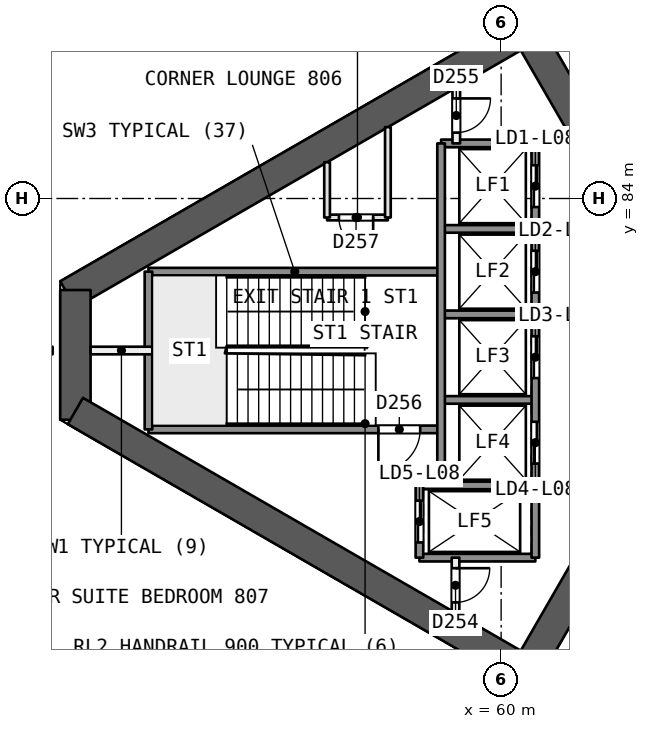
"""IFC4 building model, lengths in metres.
Left out: names, types, materials, properties, quantities, classifications, styles, units other than length and angle.
Written with IfcOpenShell. Run it as: python <this file> out.ifc"""

import sys

from ifc_helpers import new_model, si_unit, direction, frame, frame_2d, origin, place, context, subcontext, project, spatial, rectangle, extrude, element, fill, save


model = new_model("IFC4")
c1 = context("Model", 3, precision=1e-05, world=origin(), true_north=direction((0.0, 1.0)))
c2 = subcontext(c1, "Body", "Model", "MODEL_VIEW")
j1 = project(units=[si_unit("LENGTHUNIT", "METRE"), si_unit("PLANEANGLEUNIT", "RADIAN")], contexts=[c1])
p1 = place(None, origin())
s1 = spatial("IfcSite", under=j1, at=p1, CompositionType="ELEMENT")
p2 = place(p1, origin())
s2 = spatial("IfcBuilding", under=s1, at=p2, CompositionType="ELEMENT")
p3 = place(p2, frame((0.0, 0.0, 41.1)))
s3 = spatial("IfcBuildingStorey", under=s2, at=p3, CompositionType="ELEMENT", Elevation=41.1)
p4 = place(p3, frame((65.538, 80.0, 0.0), z_axis=(0.0, 0.0, 1.0), x_axis=(-0.49999662545, 0.866027352073, 0.0)))
e1 = element("IfcWall", 1, at=p4, inside=s3, PredefinedType="SHEAR", context=c2, shape_type="SweptSolid", body=[
    extrude(rectangle(XDim=10.149, YDim=0.8, at=frame_2d((5.074, 0.0))), origin(), (0.0, 0.0, 1.0), 3.7),
])
p5 = place(p4, frame((0.719, 0.0, 0.0)))
e2 = element("IfcOpeningElement", 2, at=p5, cuts=e1, PredefinedType="OPENING", context=c2, shape_type="SweptSolid", body=[
    extrude(rectangle(XDim=1.2, YDim=2.1, at=frame_2d((0.6, 1.05))), frame((0.0, 0.411, 0.0), z_axis=(0.0, -1.0, 0.0), x_axis=(1.0, 0.0, 0.0)), (0.0, 0.0, 1.0), 0.821),
])
p6 = place(p3, frame((60.664, 88.443, 0.0), z_axis=(0.0, 0.0, 1.0), x_axis=(-0.866029478545, -0.499992942241, 0.0)))
e3 = element("IfcWall", 3, at=p6, inside=s3, PredefinedType="SHEAR", context=c2, shape_type="SweptSolid", body=[
    extrude(rectangle(XDim=13.933, YDim=0.8, at=frame_2d((6.967, 0.0))), origin(), (0.0, 0.0, 1.0), 3.7),
])
p7 = place(p3, frame((48.797, 81.592, 0.0), z_axis=(0.0, 0.0, 1.0), x_axis=(0.0, -1.0, 0.0)))
e4 = element("IfcWall", 4, at=p7, inside=s3, PredefinedType="SHEAR", context=c2, shape_type="SweptSolid", body=[
    extrude(rectangle(XDim=3.415, YDim=0.8, at=frame_2d((1.707, 0.0))), origin(), (0.0, 0.0, 1.0), 3.7),
])
p8 = place(p3, frame((48.797, 78.408, 0.0), z_axis=(0.0, 0.0, 1.0), x_axis=(0.866032504327, -0.499987701298, 0.0)))
e5 = element("IfcWall", 5, at=p8, inside=s3, PredefinedType="SHEAR", context=c2, shape_type="SweptSolid", body=[
    extrude(rectangle(XDim=14.102, YDim=0.8, at=frame_2d((7.051, 0.0))), origin(), (0.0, 0.0, 1.0), 3.7),
])
p9 = place(p3, frame((60.664, 71.557, 0.0), z_axis=(0.0, 0.0, 1.0), x_axis=(0.50000409368, 0.866023040284, 0.0)))
e6 = element("IfcWall", 6, at=p9, inside=s3, PredefinedType="SHEAR", context=c2, shape_type="SweptSolid", body=[
    extrude(rectangle(XDim=9.98, YDim=0.8, at=frame_2d((4.99, 0.0))), origin(), (0.0, 0.0, 1.0), 3.7),
])
p10 = place(p9, frame((7.83, 0.0, 0.0)))
e7 = element("IfcOpeningElement", 7, at=p10, cuts=e6, PredefinedType="OPENING", context=c2, shape_type="SweptSolid", body=[
    extrude(rectangle(XDim=1.2, YDim=2.1, at=frame_2d((0.6, 1.05))), frame((0.0, 0.411, 0.0), z_axis=(0.0, -1.0, 0.0), x_axis=(1.0, 0.0, 0.0)), (0.0, 0.0, 1.0), 0.821),
])
p11 = place(p3, frame((61.197, 96.426, 0.0), z_axis=(0.0, 0.0, 1.0), x_axis=(0.499997162821, -0.866027041824, 0.0)))
e8 = element("IfcWall", 8, at=p11, inside=s3, PredefinedType="PARTITIONING", context=c2, shape_type="SweptSolid", body=[
    extrude(rectangle(XDim=14.027, YDim=0.2, at=frame_2d((7.013, 0.0))), origin(), (0.0, 0.0, 1.0), 3.2),
])
p12 = place(p3, frame((38.019, 80.0, 0.0), z_axis=(0.0, 0.0, 1.0), x_axis=(1.0, 0.0, 0.0)))
e9 = element("IfcWall", 9, at=p12, inside=s3, PredefinedType="PARTITIONING", context=c2, shape_type="SweptSolid", body=[
    extrude(rectangle(XDim=10.179, YDim=0.2, at=frame_2d((5.089, 0.0))), origin(), (0.0, 0.0, 1.0), 3.2),
])
p13 = place(p3, frame((37.87, 83.13, 0.0), z_axis=(0.0, 0.0, 1.0), x_axis=(0.866026630825, 0.499997874697, 0.0)))
e10 = element("IfcWall", 10, at=p13, inside=s3, PredefinedType="SOLIDWALL", context=c2, shape_type="SweptSolid", body=[
    extrude(rectangle(XDim=61.18, YDim=0.3, at=frame_2d((30.59, 0.0))), origin(), (0.0, 0.0, 1.0), 3.2),
])
p14 = place(p13, frame((12.181, 0.0, 0.0)))
e11 = element("IfcOpeningElement", 11, at=p14, cuts=e10, PredefinedType="OPENING", context=c2, shape_type="SweptSolid", body=[
    extrude(rectangle(XDim=2.4, YDim=2.4, at=frame_2d((1.2, 1.2))), frame((0.0, 0.161, 0.0), z_axis=(0.0, -1.0, 0.0), x_axis=(1.0, 0.0, 0.0)), (0.0, 0.0, 1.0), 0.321),
])
p15 = place(p13, frame((34.846, 0.0, 0.0)))
e12 = element("IfcOpeningElement", 12, at=p15, cuts=e10, PredefinedType="OPENING", context=c2, shape_type="SweptSolid", body=[
    extrude(rectangle(XDim=2.4, YDim=2.4, at=frame_2d((1.2, 1.2))), frame((0.0, 0.161, 0.0), z_axis=(0.0, -1.0, 0.0), x_axis=(1.0, 0.0, 0.0)), (0.0, 0.0, 1.0), 0.321),
])
p16 = place(p13, frame((47.439, 0.0, 0.0)))
e13 = element("IfcOpeningElement", 13, at=p16, cuts=e10, PredefinedType="OPENING", context=c2, shape_type="SweptSolid", body=[
    extrude(rectangle(XDim=2.4, YDim=2.4, at=frame_2d((1.2, 1.2))), frame((0.0, 0.161, 0.0), z_axis=(0.0, -1.0, 0.0), x_axis=(1.0, 0.0, 0.0)), (0.0, 0.0, 1.0), 0.321),
])
p17 = place(p13, frame((29.078, 0.0, 0.0)))
e14 = element("IfcOpeningElement", 14, at=p17, cuts=e10, PredefinedType="OPENING", context=c2, shape_type="SweptSolid", body=[
    extrude(rectangle(XDim=2.4, YDim=2.4, at=frame_2d((1.2, 1.2))), frame((0.0, 0.161, 0.0), z_axis=(0.0, -1.0, 0.0), x_axis=(1.0, 0.0, 0.0)), (0.0, 0.0, 1.0), 0.321),
])
p18 = place(p3, frame((90.854, 46.28, 0.0), z_axis=(0.0, 0.0, 1.0), x_axis=(-0.866026630825, 0.499997874697, 0.0)))
e15 = element("IfcWall", 15, at=p18, inside=s3, PredefinedType="SOLIDWALL", context=c2, shape_type="SweptSolid", body=[
    extrude(rectangle(XDim=61.18, YDim=0.3, at=frame_2d((30.59, 0.0))), origin(), (0.0, 0.0, 1.0), 3.2),
])
p19 = place(p18, frame((29.39, 0.0, 0.0)))
e16 = element("IfcOpeningElement", 16, at=p19, cuts=e15, PredefinedType="OPENING", context=c2, shape_type="SweptSolid", body=[
    extrude(rectangle(XDim=2.4, YDim=2.4, at=frame_2d((1.2, 1.2))), frame((0.0, 0.161, 0.0), z_axis=(0.0, -1.0, 0.0), x_axis=(1.0, 0.0, 0.0)), (0.0, 0.0, 1.0), 0.321),
])
p20 = place(p18, frame((34.223, 0.0, 0.0)))
e17 = element("IfcOpeningElement", 17, at=p20, cuts=e15, PredefinedType="OPENING", context=c2, shape_type="SweptSolid", body=[
    extrude(rectangle(XDim=2.4, YDim=2.4, at=frame_2d((1.2, 1.2))), frame((0.0, 0.161, 0.0), z_axis=(0.0, -1.0, 0.0), x_axis=(1.0, 0.0, 0.0)), (0.0, 0.0, 1.0), 0.321),
])
p21 = place(p18, frame((47.439, 0.0, 0.0)))
e18 = element("IfcOpeningElement", 18, at=p21, cuts=e15, PredefinedType="OPENING", context=c2, shape_type="SweptSolid", body=[
    extrude(rectangle(XDim=2.4, YDim=2.4, at=frame_2d((1.2, 1.2))), frame((0.0, 0.161, 0.0), z_axis=(0.0, -1.0, 0.0), x_axis=(1.0, 0.0, 0.0)), (0.0, 0.0, 1.0), 0.321),
])
p22 = place(p18, frame((13.116, 0.0, 0.0)))
e19 = element("IfcOpeningElement", 19, at=p22, cuts=e15, PredefinedType="OPENING", context=c2, shape_type="SweptSolid", body=[
    extrude(rectangle(XDim=2.4, YDim=2.4, at=frame_2d((1.2, 1.2))), frame((0.0, 0.161, 0.0), z_axis=(0.0, -1.0, 0.0), x_axis=(1.0, 0.0, 0.0)), (0.0, 0.0, 1.0), 0.321),
])
p23 = place(p3, frame((60.9, 85.45, 0.0), z_axis=(0.0, 0.0, 1.0), x_axis=(-1.0, 0.0, 0.0)))
e20 = element("IfcWall", 20, at=p23, inside=s3, PredefinedType="SOLIDWALL", context=c2, shape_type="SweptSolid", body=[
    extrude(rectangle(XDim=2.48, YDim=0.2, at=frame_2d((1.24, 0.0))), origin(), (0.0, 0.0, 1.0), 3.2),
])
p24 = place(p3, frame((57.02, 83.5, 0.0), z_axis=(0.0, 0.0, 1.0), x_axis=(-1.0, 0.0, 0.0)))
e21 = element("IfcWall", 21, at=p24, inside=s3, PredefinedType="PARTITIONING", context=c2, shape_type="SweptSolid", body=[
    extrude(rectangle(XDim=1.6, YDim=0.15, at=frame_2d((0.8, 0.0))), origin(), (0.0, 0.0, 1.0), 3.2),
])
p25 = place(p24, frame((0.387, 0.0, 0.0)))
e22 = element("IfcOpeningElement", 22, at=p25, cuts=e21, PredefinedType="OPENING", context=c2, shape_type="SweptSolid", body=[
    extrude(rectangle(XDim=0.9, YDim=2.1, at=frame_2d((0.45, 1.05))), frame((0.0, 0.085, 0.0), z_axis=(0.0, -1.0, 0.0), x_axis=(1.0, 0.0, 0.0)), (0.0, 0.0, 1.0), 0.171),
])
p26 = place(p3, frame((60.9, 83.2, 0.0), z_axis=(0.0, 0.0, 1.0), x_axis=(-1.0, 0.0, 0.0)))
e23 = element("IfcWall", 23, at=p26, inside=s3, PredefinedType="SOLIDWALL", context=c2, shape_type="SweptSolid", body=[
    extrude(rectangle(XDim=2.48, YDim=0.2, at=frame_2d((1.24, 0.0))), origin(), (0.0, 0.0, 1.0), 3.2),
])
p27 = place(p3, frame((58.42, 82.075, 0.0), z_axis=(0.0, 0.0, 1.0), x_axis=(-1.0, 0.0, 0.0)))
e24 = element("IfcWall", 24, at=p27, inside=s3, PredefinedType="SOLIDWALL", context=c2, shape_type="SweptSolid", body=[
    extrude(rectangle(XDim=7.7, YDim=0.2, at=frame_2d((3.85, 0.0))), origin(), (0.0, 0.0, 1.0), 3.2),
])
p28 = place(p3, frame((60.9, 80.95, 0.0), z_axis=(0.0, 0.0, 1.0), x_axis=(-1.0, 0.0, 0.0)))
e25 = element("IfcWall", 25, at=p28, inside=s3, PredefinedType="SOLIDWALL", context=c2, shape_type="SweptSolid", body=[
    extrude(rectangle(XDim=2.48, YDim=0.2, at=frame_2d((1.24, 0.0))), origin(), (0.0, 0.0, 1.0), 3.2),
])
p29 = place(p3, frame((50.82, 80.0, 0.0), z_axis=(0.0, 0.0, 1.0), x_axis=(-1.0, 0.0, 0.0)))
e26 = element("IfcWall", 26, at=p29, inside=s3, PredefinedType="PARTITIONING", context=c2, shape_type="SweptSolid", body=[
    extrude(rectangle(XDim=1.623, YDim=0.2, at=frame_2d((0.812, 0.0))), origin(), (0.0, 0.0, 1.0), 3.2),
])
p30 = place(p3, frame((60.9, 78.7, 0.0), z_axis=(0.0, 0.0, 1.0), x_axis=(-1.0, 0.0, 0.0)))
e27 = element("IfcWall", 27, at=p30, inside=s3, PredefinedType="SOLIDWALL", context=c2, shape_type="SweptSolid", body=[
    extrude(rectangle(XDim=2.48, YDim=0.2, at=frame_2d((1.24, 0.0))), origin(), (0.0, 0.0, 1.0), 3.2),
])
p31 = place(p3, frame((58.42, 77.925, 0.0), z_axis=(0.0, 0.0, 1.0), x_axis=(-1.0, 0.0, 0.0)))
e28 = element("IfcWall", 28, at=p31, inside=s3, PredefinedType="SOLIDWALL", context=c2, shape_type="SweptSolid", body=[
    extrude(rectangle(XDim=7.7, YDim=0.2, at=frame_2d((3.85, 0.0))), origin(), (0.0, 0.0, 1.0), 3.2),
])
p32 = place(p31, frame((0.55, 0.0, 0.0)))
e29 = element("IfcOpeningElement", 29, at=p32, cuts=e28, PredefinedType="OPENING", context=c2, shape_type="SweptSolid", body=[
    extrude(rectangle(XDim=1.1, YDim=2.1, at=frame_2d((0.55, 1.05))), frame((0.0, 0.11, 0.0), z_axis=(0.0, -1.0, 0.0), x_axis=(1.0, 0.0, 0.0)), (0.0, 0.0, 1.0), 0.221),
])
for number, where, z_axis, x_axis in (
    (30, (60.9, 76.45, 0.0), (0.0, 0.0, 1.0), (-1.0, 0.0, 0.0)),
    (31, (60.9, 74.55, 0.0), (0.0, 0.0, 1.0), (-1.0, 0.0, 0.0)),
):
    element("IfcWall", number, at=place(p3, frame(where, z_axis=z_axis, x_axis=x_axis)), inside=s3, PredefinedType="SOLIDWALL", context=c2, shape_type="SweptSolid", body=[
        extrude(rectangle(XDim=3.05, YDim=0.2, at=frame_2d((1.525, 0.0))), origin(), (0.0, 0.0, 1.0), 3.2),
    ])
p33 = place(p3, frame((60.9, 85.45, 0.0), z_axis=(0.0, 0.0, 1.0), x_axis=(0.0, -1.0, 0.0)))
e32 = element("IfcWall", 32, at=p33, inside=s3, PredefinedType="SOLIDWALL", context=c2, shape_type="SweptSolid", body=[
    extrude(rectangle(XDim=10.9, YDim=0.2, at=frame_2d((5.45, 0.0))), origin(), (0.0, 0.0, 1.0), 3.2),
])
p34 = place(p33, frame((0.575, 0.0, 0.0)))
e33 = element("IfcOpeningElement", 33, at=p34, cuts=e32, PredefinedType="OPENING", context=c2, shape_type="SweptSolid", body=[
    extrude(rectangle(XDim=1.1, YDim=2.1, at=frame_2d((0.55, 1.05))), frame((0.0, 0.11, 0.0), z_axis=(0.0, -1.0, 0.0), x_axis=(1.0, 0.0, 0.0)), (0.0, 0.0, 1.0), 0.221),
])
p35 = place(p33, frame((2.825, 0.0, 0.0)))
e34 = element("IfcOpeningElement", 34, at=p35, cuts=e32, PredefinedType="OPENING", context=c2, shape_type="SweptSolid", body=[
    extrude(rectangle(XDim=1.1, YDim=2.1, at=frame_2d((0.55, 1.05))), frame((0.0, 0.11, 0.0), z_axis=(0.0, -1.0, 0.0), x_axis=(1.0, 0.0, 0.0)), (0.0, 0.0, 1.0), 0.221),
])
p36 = place(p33, frame((5.075, 0.0, 0.0)))
e35 = element("IfcOpeningElement", 35, at=p36, cuts=e32, PredefinedType="OPENING", context=c2, shape_type="SweptSolid", body=[
    extrude(rectangle(XDim=1.1, YDim=2.1, at=frame_2d((0.55, 1.05))), frame((0.0, 0.11, 0.0), z_axis=(0.0, -1.0, 0.0), x_axis=(1.0, 0.0, 0.0)), (0.0, 0.0, 1.0), 0.221),
])
p37 = place(p33, frame((7.325, 0.0, 0.0)))
e36 = element("IfcOpeningElement", 36, at=p37, cuts=e32, PredefinedType="OPENING", context=c2, shape_type="SweptSolid", body=[
    extrude(rectangle(XDim=1.1, YDim=2.1, at=frame_2d((0.55, 1.05))), frame((0.0, 0.11, 0.0), z_axis=(0.0, -1.0, 0.0), x_axis=(1.0, 0.0, 0.0)), (0.0, 0.0, 1.0), 0.221),
])
p38 = place(p3, frame((58.82, 86.917, 0.0), z_axis=(0.0, 0.0, 1.0), x_axis=(0.0, -1.0, 0.0)))
e37 = element("IfcWall", 37, at=p38, inside=s3, PredefinedType="PARTITIONING", context=c2, shape_type="SweptSolid", body=[
    extrude(rectangle(XDim=1.467, YDim=0.2, at=frame_2d((0.733, 0.0))), origin(), (0.0, 0.0, 1.0), 3.2),
])
p39 = place(p38, frame((0.283, 0.0, 0.0)))
e38 = element("IfcOpeningElement", 38, at=p39, cuts=e37, PredefinedType="OPENING", context=c2, shape_type="SweptSolid", body=[
    extrude(rectangle(XDim=0.9, YDim=2.1, at=frame_2d((0.45, 1.05))), frame((0.0, 0.11, 0.0), z_axis=(0.0, -1.0, 0.0), x_axis=(1.0, 0.0, 0.0)), (0.0, 0.0, 1.0), 0.221),
])
p40 = place(p3, frame((58.8, 74.55, 0.0), z_axis=(0.0, 0.0, 1.0), x_axis=(0.0, -1.0, 0.0)))
e39 = element("IfcWall", 39, at=p40, inside=s3, PredefinedType="PARTITIONING", context=c2, shape_type="SweptSolid", body=[
    extrude(rectangle(XDim=1.455, YDim=0.2, at=frame_2d((0.728, 0.0))), origin(), (0.0, 0.0, 1.0), 3.2),
])
p41 = place(p40, frame((0.278, 0.0, 0.0)))
e40 = element("IfcOpeningElement", 40, at=p41, cuts=e39, PredefinedType="OPENING", context=c2, shape_type="SweptSolid", body=[
    extrude(rectangle(XDim=0.9, YDim=2.1, at=frame_2d((0.45, 1.05))), frame((0.0, 0.11, 0.0), z_axis=(0.0, -1.0, 0.0), x_axis=(1.0, 0.0, 0.0)), (0.0, 0.0, 1.0), 0.221),
])
p42 = place(p3, frame((58.42, 85.45, 0.0), z_axis=(0.0, 0.0, 1.0), x_axis=(0.0, -1.0, 0.0)))
e41 = element("IfcWall", 41, at=p42, inside=s3, PredefinedType="SOLIDWALL", context=c2, shape_type="SweptSolid", body=[
    extrude(rectangle(XDim=9.0, YDim=0.2, at=frame_2d((4.5, 0.0))), origin(), (0.0, 0.0, 1.0), 3.2),
])
p43 = place(p3, frame((57.85, 76.45, 0.0), z_axis=(0.0, 0.0, 1.0), x_axis=(0.0, -1.0, 0.0)))
e42 = element("IfcWall", 42, at=p43, inside=s3, PredefinedType="SOLIDWALL", context=c2, shape_type="SweptSolid", body=[
    extrude(rectangle(XDim=1.9, YDim=0.2, at=frame_2d((0.95, 0.0))), origin(), (0.0, 0.0, 1.0), 3.2),
])
p44 = place(p43, frame((0.4, 0.0, 0.0)))
e43 = element("IfcOpeningElement", 43, at=p44, cuts=e42, PredefinedType="OPENING", context=c2, shape_type="SweptSolid", body=[
    extrude(rectangle(XDim=1.1, YDim=2.1, at=frame_2d((0.55, 1.05))), frame((0.0, 0.11, 0.0), z_axis=(0.0, -1.0, 0.0), x_axis=(1.0, 0.0, 0.0)), (0.0, 0.0, 1.0), 0.221),
])
p45 = place(p3, frame((57.02, 85.877, 0.0), z_axis=(0.0, 0.0, 1.0), x_axis=(0.0, -1.0, 0.0)))
e44 = element("IfcWall", 44, at=p45, inside=s3, PredefinedType="PARTITIONING", context=c2, shape_type="SweptSolid", body=[
    extrude(rectangle(XDim=2.377, YDim=0.15, at=frame_2d((1.189, 0.0))), origin(), (0.0, 0.0, 1.0), 3.2),
])
p46 = place(p3, frame((55.42, 84.954, 0.0), z_axis=(0.0, 0.0, 1.0), x_axis=(0.0, -1.0, 0.0)))
e45 = element("IfcWall", 45, at=p46, inside=s3, PredefinedType="PARTITIONING", context=c2, shape_type="SweptSolid", body=[
    extrude(rectangle(XDim=1.454, YDim=0.15, at=frame_2d((0.727, 0.0))), origin(), (0.0, 0.0, 1.0), 3.2),
])
p47 = place(p3, frame((50.72, 82.075, 0.0), z_axis=(0.0, 0.0, 1.0), x_axis=(0.0, -1.0, 0.0)))
e46 = element("IfcWall", 46, at=p47, inside=s3, PredefinedType="SOLIDWALL", context=c2, shape_type="SweptSolid", body=[
    extrude(rectangle(XDim=4.15, YDim=0.2, at=frame_2d((2.075, 0.0))), origin(), (0.0, 0.0, 1.0), 3.2),
])
p48 = place(p34, origin())
e47 = element("IfcDoor", 47, at=p48, inside=s3, OperationType="SLIDING_TO_RIGHT", PredefinedType="NOTDEFINED", context=c2, shape_type="SweptSolid", body=[
    extrude(rectangle(XDim=1.1, YDim=2.1, at=frame_2d((0.55, 1.05))), frame((0.0, 0.025, 0.0), z_axis=(0.0, -1.0, 0.0), x_axis=(1.0, 0.0, 0.0)), (0.0, 0.0, 1.0), 0.05),
])
fill(e33, e47)
p49 = place(p35, origin())
e48 = element("IfcDoor", 48, at=p49, inside=s3, OperationType="SLIDING_TO_LEFT", PredefinedType="NOTDEFINED", context=c2, shape_type="SweptSolid", body=[
    extrude(rectangle(XDim=1.1, YDim=2.1, at=frame_2d((0.55, 1.05))), frame((0.0, 0.025, 0.0), z_axis=(0.0, -1.0, 0.0), x_axis=(1.0, 0.0, 0.0)), (0.0, 0.0, 1.0), 0.05),
])
fill(e34, e48)
p50 = place(p36, origin())
e49 = element("IfcDoor", 49, at=p50, inside=s3, OperationType="SLIDING_TO_RIGHT", PredefinedType="NOTDEFINED", context=c2, shape_type="SweptSolid", body=[
    extrude(rectangle(XDim=1.1, YDim=2.1, at=frame_2d((0.55, 1.05))), frame((0.0, 0.025, 0.0), z_axis=(0.0, -1.0, 0.0), x_axis=(1.0, 0.0, 0.0)), (0.0, 0.0, 1.0), 0.05),
])
fill(e35, e49)
p51 = place(p37, origin())
e50 = element("IfcDoor", 50, at=p51, inside=s3, OperationType="SLIDING_TO_LEFT", PredefinedType="NOTDEFINED", context=c2, shape_type="SweptSolid", body=[
    extrude(rectangle(XDim=1.1, YDim=2.1, at=frame_2d((0.55, 1.05))), frame((0.0, 0.025, 0.0), z_axis=(0.0, -1.0, 0.0), x_axis=(1.0, 0.0, 0.0)), (0.0, 0.0, 1.0), 0.05),
])
fill(e36, e50)
p52 = place(p44, origin())
e51 = element("IfcDoor", 51, at=p52, inside=s3, OperationType="SLIDING_TO_RIGHT", PredefinedType="NOTDEFINED", context=c2, shape_type="SweptSolid", body=[
    extrude(rectangle(XDim=1.1, YDim=2.1, at=frame_2d((0.55, 1.05))), frame((0.0, 0.025, 0.0), z_axis=(0.0, -1.0, 0.0), x_axis=(1.0, 0.0, 0.0)), (0.0, 0.0, 1.0), 0.05),
])
fill(e43, e51)
p53 = place(p41, origin())
e52 = element("IfcDoor", 52, at=p53, inside=s3, OperationType="SINGLE_SWING_LEFT", PredefinedType="NOTDEFINED", context=c2, shape_type="SweptSolid", body=[
    extrude(rectangle(XDim=0.9, YDim=2.1, at=frame_2d((0.45, 1.05))), frame((0.0, 0.025, 0.0), z_axis=(0.0, -1.0, 0.0), x_axis=(1.0, 0.0, 0.0)), (0.0, 0.0, 1.0), 0.05),
])
fill(e40, e52)
p54 = place(p39, origin())
e53 = element("IfcDoor", 53, at=p54, inside=s3, OperationType="SINGLE_SWING_LEFT", PredefinedType="NOTDEFINED", context=c2, shape_type="SweptSolid", body=[
    extrude(rectangle(XDim=0.9, YDim=2.1, at=frame_2d((0.45, 1.05))), frame((0.0, 0.025, 0.0), z_axis=(0.0, -1.0, 0.0), x_axis=(1.0, 0.0, 0.0)), (0.0, 0.0, 1.0), 0.05),
])
fill(e38, e53)
p55 = place(p32, origin())
e54 = element("IfcDoor", 54, at=p55, inside=s3, OperationType="SINGLE_SWING_RIGHT", PredefinedType="NOTDEFINED", context=c2, shape_type="SweptSolid", body=[
    extrude(rectangle(XDim=1.1, YDim=2.1, at=frame_2d((0.55, 1.05))), frame((0.0, 0.025, 0.0), z_axis=(0.0, -1.0, 0.0), x_axis=(1.0, 0.0, 0.0)), (0.0, 0.0, 1.0), 0.05),
])
fill(e29, e54)
p56 = place(p25, origin())
e55 = element("IfcDoor", 55, at=p56, inside=s3, OperationType="SINGLE_SWING_LEFT", PredefinedType="NOTDEFINED", context=c2, shape_type="SweptSolid", body=[
    extrude(rectangle(XDim=0.9, YDim=2.1, at=frame_2d((0.45, 1.05))), frame((0.0, 0.025, 0.0), z_axis=(0.0, -1.0, 0.0), x_axis=(1.0, 0.0, 0.0)), (0.0, 0.0, 1.0), 0.05),
])
fill(e22, e55)
save(model, sys.argv[1])
